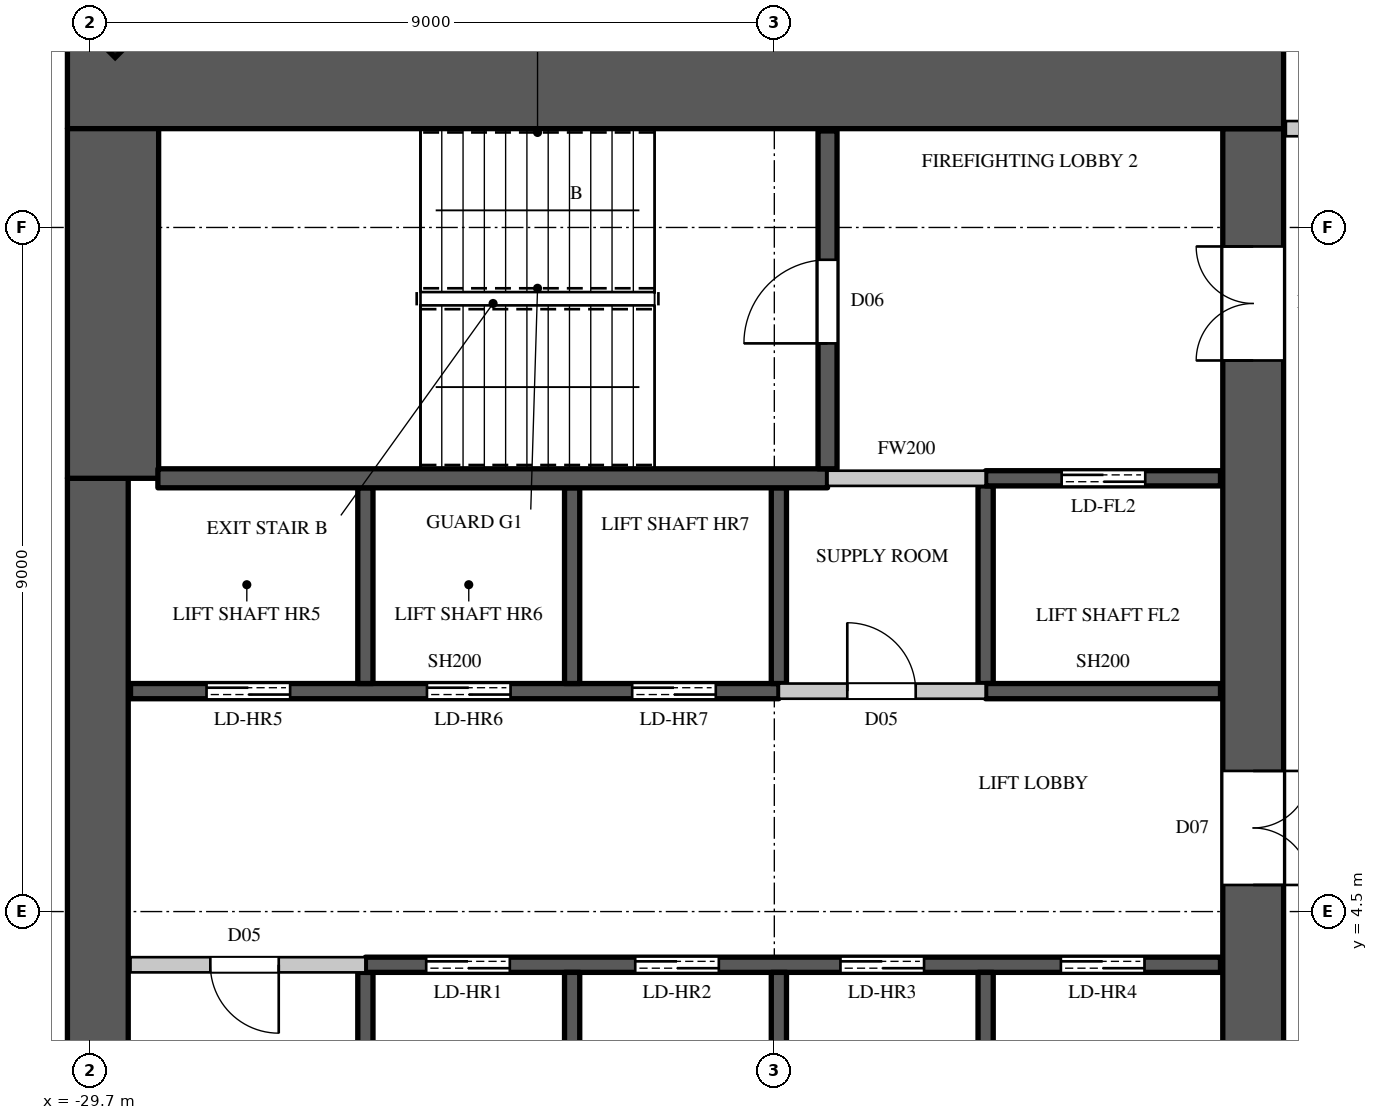
"""IFC4 building model, lengths in metres.
Left out: names, types, materials, properties, quantities, classifications, styles, units other than length and angle.
Written with IfcOpenShell. Run it as: python <this file> out.ifc"""

import sys

from ifc_helpers import new_model, si_unit, direction, frame, frame_2d, origin, origin_2d, place, context, subcontext, project, spatial, rectangle, extrude, element, fill, save


model = new_model("IFC4")
c1 = context("Model", 3, precision=1e-05, world=origin(), true_north=direction((0.0, 1.0)))
c2 = subcontext(c1, "Body", "Model", "MODEL_VIEW")
j1 = project(units=[si_unit("LENGTHUNIT", "METRE"), si_unit("PLANEANGLEUNIT", "RADIAN")], contexts=[c1])
p1 = place(None, origin())
s1 = spatial("IfcSite", under=j1, at=p1, CompositionType="ELEMENT")
p2 = place(p1, origin())
s2 = spatial("IfcBuilding", under=s1, at=p2, CompositionType="ELEMENT")
p3 = place(p2, frame((0.0, 0.0, 230.2)))
s3 = spatial("IfcBuildingStorey", under=s2, at=p3, CompositionType="ELEMENT", Elevation=230.2)
p4 = place(p3, frame((-29.443, 16.443, 0.0), z_axis=(0.0, 0.0, 1.0), x_axis=(-0.707106781187, -0.707106781187, 0.0)))
e1 = element("IfcColumn", 1, at=p4, inside=s3, PredefinedType="COLUMN", context=c2, shape_type="SweptSolid", body=[
    extrude(rectangle(XDim=0.9, YDim=1.1, at=origin_2d()), origin(), (0.0, 0.0, 1.0), 4.1),
])
p5 = place(p3, frame((-30.0, 15.4, 0.0), z_axis=(0.0, 0.0, 1.0), x_axis=(1.0, 0.0, 0.0)))
e2 = element("IfcWall", 2, at=p5, inside=s3, PredefinedType="SHEAR", context=c2, shape_type="SweptSolid", body=[
    extrude(rectangle(XDim=16.0, YDim=1.2, at=frame_2d((8.0, 0.0))), origin(), (0.0, 0.0, 1.0), 4.1),
])
p6 = place(p3, frame((-14.4, -14.8, 0.0), z_axis=(0.0, 0.0, 1.0), x_axis=(0.0, 1.0, 0.0)))
e3 = element("IfcWall", 3, at=p6, inside=s3, PredefinedType="SHEAR", context=c2, shape_type="SweptSolid", body=[
    extrude(rectangle(XDim=29.6, YDim=0.8, at=frame_2d((14.8, 0.0))), origin(), (0.0, 0.0, 1.0), 4.1),
])
p7 = place(p6, frame((1.55, 0.0, 0.0)))
e4 = element("IfcOpeningElement", 4, at=p7, cuts=e3, PredefinedType="OPENING", context=c2, shape_type="SweptSolid", body=[
    extrude(rectangle(XDim=1.5, YDim=2.4, at=frame_2d((0.75, 1.2))), frame((0.0, 0.41, 0.0), z_axis=(0.0, -1.0, 0.0), x_axis=(1.0, 0.0, 0.0)), (0.0, 0.0, 1.0), 0.82),
])
p8 = place(p6, frame((26.55, 0.0, 0.0)))
e5 = element("IfcOpeningElement", 5, at=p8, cuts=e3, PredefinedType="OPENING", context=c2, shape_type="SweptSolid", body=[
    extrude(rectangle(XDim=1.5, YDim=2.4, at=frame_2d((0.75, 1.2))), frame((0.0, 0.41, 0.0), z_axis=(0.0, -1.0, 0.0), x_axis=(1.0, 0.0, 0.0)), (0.0, 0.0, 1.0), 0.82),
])
p9 = place(p6, frame((8.45, 0.0, 0.0)))
e6 = element("IfcOpeningElement", 6, at=p9, cuts=e3, PredefinedType="OPENING", context=c2, shape_type="SweptSolid", body=[
    extrude(rectangle(XDim=1.5, YDim=2.4, at=frame_2d((0.75, 1.2))), frame((0.0, 0.41, 0.0), z_axis=(0.0, -1.0, 0.0), x_axis=(1.0, 0.0, 0.0)), (0.0, 0.0, 1.0), 0.82),
])
p10 = place(p6, frame((19.65, 0.0, 0.0)))
e7 = element("IfcOpeningElement", 7, at=p10, cuts=e3, PredefinedType="OPENING", context=c2, shape_type="SweptSolid", body=[
    extrude(rectangle(XDim=1.5, YDim=2.4, at=frame_2d((0.75, 1.2))), frame((0.0, 0.41, 0.0), z_axis=(0.0, -1.0, 0.0), x_axis=(1.0, 0.0, 0.0)), (0.0, 0.0, 1.0), 0.82),
])
p11 = place(p6, frame((14.5, 0.0, 0.0)))
e8 = element("IfcOpeningElement", 8, at=p11, cuts=e3, PredefinedType="OPENING", context=c2, shape_type="SweptSolid", body=[
    extrude(rectangle(XDim=0.6, YDim=2.0, at=frame_2d((0.3, 1.0))), frame((0.0, 0.41, 0.0), z_axis=(0.0, -1.0, 0.0), x_axis=(1.0, 0.0, 0.0)), (0.0, 0.0, 1.0), 0.82),
])
p12 = place(p3, frame((-29.6, -10.2, 0.0), z_axis=(0.0, 0.0, 1.0), x_axis=(0.0, 1.0, 0.0)))
e9 = element("IfcWall", 9, at=p12, inside=s3, PredefinedType="SHEAR", context=c2, shape_type="SweptSolid", body=[
    extrude(rectangle(XDim=20.4, YDim=0.8, at=frame_2d((10.2, 0.0))), origin(), (0.0, 0.0, 1.0), 4.1),
])
p13 = place(p3, frame((-29.4, 10.2, 0.0), z_axis=(0.0, 0.0, 1.0), x_axis=(0.0, 1.0, 0.0)))
e10 = element("IfcWall", 10, at=p13, inside=s3, PredefinedType="SHEAR", context=c2, shape_type="SweptSolid", body=[
    extrude(rectangle(XDim=4.6, YDim=1.2, at=frame_2d((2.3, 0.0))), origin(), (0.0, 0.0, 1.0), 4.1),
])
p14 = place(p3, frame((-29.17, 3.8, 0.0), z_axis=(0.0, 0.0, 1.0), x_axis=(1.0, 0.0, 0.0)))
e11 = element("IfcWall", 11, at=p14, inside=s3, PredefinedType="PARTITIONING", context=c2, shape_type="SweptSolid", body=[
    extrude(rectangle(XDim=3.09, YDim=0.2, at=frame_2d((1.545, 0.0))), origin(), (0.0, 0.0, 1.0), 3.8),
])
p15 = place(p14, frame((1.05, 0.0, 0.0)))
e12 = element("IfcOpeningElement", 12, at=p15, cuts=e11, PredefinedType="OPENING", context=c2, shape_type="SweptSolid", body=[
    extrude(rectangle(XDim=0.9, YDim=2.2, at=frame_2d((0.45, 1.1))), frame((0.0, 0.11, 0.0), z_axis=(0.0, -1.0, 0.0), x_axis=(1.0, 0.0, 0.0)), (0.0, 0.0, 1.0), 0.22),
])
p16 = place(p3, frame((-20.64, 7.4, 0.0), z_axis=(0.0, 0.0, 1.0), x_axis=(1.0, 0.0, 0.0)))
e13 = element("IfcWall", 13, at=p16, inside=s3, PredefinedType="PARTITIONING", context=c2, shape_type="SweptSolid", body=[
    extrude(rectangle(XDim=2.72, YDim=0.2, at=frame_2d((1.36, 0.0))), origin(), (0.0, 0.0, 1.0), 3.8),
])
p17 = place(p16, frame((0.9, 0.0, 0.0)))
e14 = element("IfcOpeningElement", 14, at=p17, cuts=e13, PredefinedType="OPENING", context=c2, shape_type="SweptSolid", body=[
    extrude(rectangle(XDim=0.9, YDim=2.2, at=frame_2d((0.45, 1.1))), frame((0.0, 0.11, 0.0), z_axis=(0.0, -1.0, 0.0), x_axis=(1.0, 0.0, 0.0)), (0.0, 0.0, 1.0), 0.22),
])
p18 = place(p3, frame((-20.0, 10.2, 0.0), z_axis=(0.0, 0.0, 1.0), x_axis=(1.0, 0.0, 0.0)))
e15 = element("IfcWall", 15, at=p18, inside=s3, PredefinedType="PARTITIONING", context=c2, shape_type="SweptSolid", body=[
    extrude(rectangle(XDim=2.08, YDim=0.2, at=frame_2d((1.04, 0.0))), origin(), (0.0, 0.0, 1.0), 3.8),
])
p19 = place(p3, frame((-13.97, 14.8, 0.0), z_axis=(0.0, 0.0, 1.0), x_axis=(1.0, 0.0, 0.0)))
e16 = element("IfcWall", 16, at=p19, inside=s3, PredefinedType="PARTITIONING", context=c2, shape_type="SweptSolid", body=[
    extrude(rectangle(XDim=2.87, YDim=0.2, at=frame_2d((1.435, 0.0))), origin(), (0.0, 0.0, 1.0), 3.8),
])
p20 = place(p3, frame((-29.17, 7.4, 0.0), z_axis=(0.0, 0.0, 1.0), x_axis=(1.0, 0.0, 0.0)))
e17 = element("IfcWall", 17, at=p20, inside=s3, PredefinedType="SHEAR", context=c2, shape_type="SweptSolid", body=[
    extrude(rectangle(XDim=8.53, YDim=0.2, at=frame_2d((4.265, 0.0))), origin(), (0.0, 0.0, 1.0), 3.8),
])
p21 = place(p20, frame((1.0, 0.0, 0.0)))
e18 = element("IfcOpeningElement", 18, at=p21, cuts=e17, PredefinedType="OPENING", context=c2, shape_type="SweptSolid", body=[
    extrude(rectangle(XDim=1.1, YDim=2.2, at=frame_2d((0.55, 1.1))), frame((0.0, 0.11, 0.0), z_axis=(0.0, -1.0, 0.0), x_axis=(1.0, 0.0, 0.0)), (0.0, 0.0, 1.0), 0.22),
])
p22 = place(p20, frame((3.9, 0.0, 0.0)))
e19 = element("IfcOpeningElement", 19, at=p22, cuts=e17, PredefinedType="OPENING", context=c2, shape_type="SweptSolid", body=[
    extrude(rectangle(XDim=1.1, YDim=2.2, at=frame_2d((0.55, 1.1))), frame((0.0, 0.11, 0.0), z_axis=(0.0, -1.0, 0.0), x_axis=(1.0, 0.0, 0.0)), (0.0, 0.0, 1.0), 0.22),
])
p23 = place(p20, frame((6.6, 0.0, 0.0)))
e20 = element("IfcOpeningElement", 20, at=p23, cuts=e17, PredefinedType="OPENING", context=c2, shape_type="SweptSolid", body=[
    extrude(rectangle(XDim=1.1, YDim=2.2, at=frame_2d((0.55, 1.1))), frame((0.0, 0.11, 0.0), z_axis=(0.0, -1.0, 0.0), x_axis=(1.0, 0.0, 0.0)), (0.0, 0.0, 1.0), 0.22),
])
p24 = place(p3, frame((-26.08, 1.1, 0.0), z_axis=(0.0, 0.0, 1.0), x_axis=(0.0, 1.0, 0.0)))
e21 = element("IfcWall", 21, at=p24, inside=s3, PredefinedType="SHEAR", context=c2, shape_type="SweptSolid", body=[
    extrude(rectangle(XDim=2.6, YDim=0.2, at=frame_2d((1.3, 0.0))), origin(), (0.0, 0.0, 1.0), 3.8),
])
p25 = place(p3, frame((-26.08, 3.8, 0.0), z_axis=(0.0, 0.0, 1.0), x_axis=(1.0, 0.0, 0.0)))
e22 = element("IfcWall", 22, at=p25, inside=s3, PredefinedType="SHEAR", context=c2, shape_type="SweptSolid", body=[
    extrude(rectangle(XDim=11.25, YDim=0.2, at=frame_2d((5.625, 0.0))), origin(), (0.0, 0.0, 1.0), 3.8),
])
p26 = place(p25, frame((0.8, 0.0, 0.0)))
e23 = element("IfcOpeningElement", 23, at=p26, cuts=e22, PredefinedType="OPENING", context=c2, shape_type="SweptSolid", body=[
    extrude(rectangle(XDim=1.1, YDim=2.2, at=frame_2d((0.55, 1.1))), frame((0.0, 0.11, 0.0), z_axis=(0.0, -1.0, 0.0), x_axis=(1.0, 0.0, 0.0)), (0.0, 0.0, 1.0), 0.22),
])
p27 = place(p25, frame((3.55, 0.0, 0.0)))
e24 = element("IfcOpeningElement", 24, at=p27, cuts=e22, PredefinedType="OPENING", context=c2, shape_type="SweptSolid", body=[
    extrude(rectangle(XDim=1.1, YDim=2.2, at=frame_2d((0.55, 1.1))), frame((0.0, 0.11, 0.0), z_axis=(0.0, -1.0, 0.0), x_axis=(1.0, 0.0, 0.0)), (0.0, 0.0, 1.0), 0.22),
])
p28 = place(p25, frame((6.25, 0.0, 0.0)))
e25 = element("IfcOpeningElement", 25, at=p28, cuts=e22, PredefinedType="OPENING", context=c2, shape_type="SweptSolid", body=[
    extrude(rectangle(XDim=1.1, YDim=2.2, at=frame_2d((0.55, 1.1))), frame((0.0, 0.11, 0.0), z_axis=(0.0, -1.0, 0.0), x_axis=(1.0, 0.0, 0.0)), (0.0, 0.0, 1.0), 0.22),
])
p29 = place(p25, frame((9.15, 0.0, 0.0)))
e26 = element("IfcOpeningElement", 26, at=p29, cuts=e22, PredefinedType="OPENING", context=c2, shape_type="SweptSolid", body=[
    extrude(rectangle(XDim=1.1, YDim=2.2, at=frame_2d((0.55, 1.1))), frame((0.0, 0.11, 0.0), z_axis=(0.0, -1.0, 0.0), x_axis=(1.0, 0.0, 0.0)), (0.0, 0.0, 1.0), 0.22),
])
p30 = place(p3, frame((-26.08, 7.5, 0.0), z_axis=(0.0, 0.0, 1.0), x_axis=(0.0, 1.0, 0.0)))
e27 = element("IfcWall", 27, at=p30, inside=s3, PredefinedType="SHEAR", context=c2, shape_type="SweptSolid", body=[
    extrude(rectangle(XDim=2.575, YDim=0.2, at=frame_2d((1.288, 0.0))), origin(), (0.0, 0.0, 1.0), 4.1),
])
p31 = place(p3, frame((-23.36, 1.1, 0.0), z_axis=(0.0, 0.0, 1.0), x_axis=(0.0, 1.0, 0.0)))
e28 = element("IfcWall", 28, at=p31, inside=s3, PredefinedType="SHEAR", context=c2, shape_type="SweptSolid", body=[
    extrude(rectangle(XDim=2.6, YDim=0.2, at=frame_2d((1.3, 0.0))), origin(), (0.0, 0.0, 1.0), 4.1),
])
p32 = place(p3, frame((-23.36, 7.5, 0.0), z_axis=(0.0, 0.0, 1.0), x_axis=(0.0, 1.0, 0.0)))
e29 = element("IfcWall", 29, at=p32, inside=s3, PredefinedType="SHEAR", context=c2, shape_type="SweptSolid", body=[
    extrude(rectangle(XDim=2.575, YDim=0.2, at=frame_2d((1.288, 0.0))), origin(), (0.0, 0.0, 1.0), 4.1),
])
p33 = place(p3, frame((-20.64, 1.1, 0.0), z_axis=(0.0, 0.0, 1.0), x_axis=(0.0, 1.0, 0.0)))
e30 = element("IfcWall", 30, at=p33, inside=s3, PredefinedType="SHEAR", context=c2, shape_type="SweptSolid", body=[
    extrude(rectangle(XDim=2.6, YDim=0.2, at=frame_2d((1.3, 0.0))), origin(), (0.0, 0.0, 1.0), 4.1),
])
p34 = place(p3, frame((-20.64, 7.5, 0.0), z_axis=(0.0, 0.0, 1.0), x_axis=(0.0, 1.0, 0.0)))
e31 = element("IfcWall", 31, at=p34, inside=s3, PredefinedType="SHEAR", context=c2, shape_type="SweptSolid", body=[
    extrude(rectangle(XDim=2.575, YDim=0.2, at=frame_2d((1.288, 0.0))), origin(), (0.0, 0.0, 1.0), 3.8),
])
p35 = place(p3, frame((-17.92, 1.1, 0.0), z_axis=(0.0, 0.0, 1.0), x_axis=(0.0, 1.0, 0.0)))
e32 = element("IfcWall", 32, at=p35, inside=s3, PredefinedType="SHEAR", context=c2, shape_type="SweptSolid", body=[
    extrude(rectangle(XDim=2.6, YDim=0.2, at=frame_2d((1.3, 0.0))), origin(), (0.0, 0.0, 1.0), 4.1),
])
p36 = place(p3, frame((-17.92, 7.5, 0.0), z_axis=(0.0, 0.0, 1.0), x_axis=(0.0, 1.0, 0.0)))
e33 = element("IfcWall", 33, at=p36, inside=s3, PredefinedType="SHEAR", context=c2, shape_type="SweptSolid", body=[
    extrude(rectangle(XDim=2.6, YDim=0.2, at=frame_2d((1.3, 0.0))), origin(), (0.0, 0.0, 1.0), 3.8),
])
p37 = place(p3, frame((-17.92, 7.4, 0.0), z_axis=(0.0, 0.0, 1.0), x_axis=(1.0, 0.0, 0.0)))
e34 = element("IfcWall", 34, at=p37, inside=s3, PredefinedType="SHEAR", context=c2, shape_type="SweptSolid", body=[
    extrude(rectangle(XDim=3.09, YDim=0.2, at=frame_2d((1.545, 0.0))), origin(), (0.0, 0.0, 1.0), 3.8),
])
p38 = place(p3, frame((-17.92, 10.2, 0.0), z_axis=(0.0, 0.0, 1.0), x_axis=(1.0, 0.0, 0.0)))
e35 = element("IfcWall", 35, at=p38, inside=s3, PredefinedType="SHEAR", context=c2, shape_type="SweptSolid", body=[
    extrude(rectangle(XDim=3.09, YDim=0.2, at=frame_2d((1.545, 0.0))), origin(), (0.0, 0.0, 1.0), 3.8),
])
p39 = place(p38, frame((1.0, 0.0, 0.0)))
e36 = element("IfcOpeningElement", 36, at=p39, cuts=e35, PredefinedType="OPENING", context=c2, shape_type="SweptSolid", body=[
    extrude(rectangle(XDim=1.1, YDim=2.2, at=frame_2d((0.55, 1.1))), frame((0.0, 0.11, 0.0), z_axis=(0.0, -1.0, 0.0), x_axis=(1.0, 0.0, 0.0)), (0.0, 0.0, 1.0), 0.22),
])
p40 = place(p3, frame((-28.81, 10.2, 0.0), z_axis=(0.0, 0.0, 1.0), x_axis=(1.0, 0.0, 0.0)))
e37 = element("IfcWall", 37, at=p40, inside=s3, PredefinedType="SHEAR", context=c2, shape_type="SweptSolid", body=[
    extrude(rectangle(XDim=8.81, YDim=0.25, at=frame_2d((4.405, 0.0))), origin(), (0.0, 0.0, 1.0), 3.8),
])
p41 = place(p3, frame((-20.0, 10.325, 0.0), z_axis=(0.0, 0.0, 1.0), x_axis=(0.0, 1.0, 0.0)))
e38 = element("IfcWall", 38, at=p41, inside=s3, PredefinedType="SHEAR", context=c2, shape_type="SweptSolid", body=[
    extrude(rectangle(XDim=4.445, YDim=0.25, at=frame_2d((2.223, 0.0))), origin(), (0.0, 0.0, 1.0), 3.8),
])
p42 = place(p41, frame((1.65, 0.0, 0.0)))
e39 = element("IfcOpeningElement", 39, at=p42, cuts=e38, PredefinedType="OPENING", context=c2, shape_type="SweptSolid", body=[
    extrude(rectangle(XDim=1.1, YDim=2.2, at=frame_2d((0.55, 1.1))), frame((0.0, 0.135, 0.0), z_axis=(0.0, -1.0, 0.0), x_axis=(1.0, 0.0, 0.0)), (0.0, 0.0, 1.0), 0.27),
])
p43 = place(p42, origin())
e40 = element("IfcDoor", 40, at=p43, inside=s3, OperationType="SINGLE_SWING_LEFT", PredefinedType="DOOR", context=c2, shape_type="SweptSolid", body=[
    extrude(rectangle(XDim=1.1, YDim=2.2, at=frame_2d((0.55, 1.1))), frame((0.0, 0.025, 0.0), z_axis=(0.0, -1.0, 0.0), x_axis=(1.0, 0.0, 0.0)), (0.0, 0.0, 1.0), 0.05),
])
fill(e39, e40)
p44 = place(p15, origin())
e41 = element("IfcDoor", 41, at=p44, inside=s3, OperationType="SINGLE_SWING_LEFT", PredefinedType="DOOR", context=c2, shape_type="SweptSolid", body=[
    extrude(rectangle(XDim=0.9, YDim=2.2, at=frame_2d((0.45, 1.1))), frame((0.0, 0.025, 0.0), z_axis=(0.0, -1.0, 0.0), x_axis=(1.0, 0.0, 0.0)), (0.0, 0.0, 1.0), 0.05),
])
fill(e12, e41)
p45 = place(p17, origin())
e42 = element("IfcDoor", 42, at=p45, inside=s3, OperationType="SINGLE_SWING_LEFT", PredefinedType="DOOR", context=c2, shape_type="SweptSolid", body=[
    extrude(rectangle(XDim=0.9, YDim=2.2, at=frame_2d((0.45, 1.1))), frame((0.0, 0.025, 0.0), z_axis=(0.0, -1.0, 0.0), x_axis=(1.0, 0.0, 0.0)), (0.0, 0.0, 1.0), 0.05),
])
fill(e14, e42)
p46 = place(p26, origin())
e43 = element("IfcDoor", 43, at=p46, inside=s3, OperationType="DOUBLE_DOOR_SLIDING", PredefinedType="DOOR", context=c2, shape_type="SweptSolid", body=[
    extrude(rectangle(XDim=1.1, YDim=2.2, at=frame_2d((0.55, 1.1))), frame((0.0, 0.025, 0.0), z_axis=(0.0, -1.0, 0.0), x_axis=(1.0, 0.0, 0.0)), (0.0, 0.0, 1.0), 0.05),
])
fill(e23, e43)
p47 = place(p27, origin())
e44 = element("IfcDoor", 44, at=p47, inside=s3, OperationType="DOUBLE_DOOR_SLIDING", PredefinedType="DOOR", context=c2, shape_type="SweptSolid", body=[
    extrude(rectangle(XDim=1.1, YDim=2.2, at=frame_2d((0.55, 1.1))), frame((0.0, 0.025, 0.0), z_axis=(0.0, -1.0, 0.0), x_axis=(1.0, 0.0, 0.0)), (0.0, 0.0, 1.0), 0.05),
])
fill(e24, e44)
p48 = place(p28, origin())
e45 = element("IfcDoor", 45, at=p48, inside=s3, OperationType="DOUBLE_DOOR_SLIDING", PredefinedType="DOOR", context=c2, shape_type="SweptSolid", body=[
    extrude(rectangle(XDim=1.1, YDim=2.2, at=frame_2d((0.55, 1.1))), frame((0.0, 0.025, 0.0), z_axis=(0.0, -1.0, 0.0), x_axis=(1.0, 0.0, 0.0)), (0.0, 0.0, 1.0), 0.05),
])
fill(e25, e45)
p49 = place(p29, origin())
e46 = element("IfcDoor", 46, at=p49, inside=s3, OperationType="DOUBLE_DOOR_SLIDING", PredefinedType="DOOR", context=c2, shape_type="SweptSolid", body=[
    extrude(rectangle(XDim=1.1, YDim=2.2, at=frame_2d((0.55, 1.1))), frame((0.0, 0.025, 0.0), z_axis=(0.0, -1.0, 0.0), x_axis=(1.0, 0.0, 0.0)), (0.0, 0.0, 1.0), 0.05),
])
fill(e26, e46)
p50 = place(p21, origin())
e47 = element("IfcDoor", 47, at=p50, inside=s3, OperationType="DOUBLE_DOOR_SLIDING", PredefinedType="DOOR", context=c2, shape_type="SweptSolid", body=[
    extrude(rectangle(XDim=1.1, YDim=2.2, at=frame_2d((0.55, 1.1))), frame((0.0, 0.025, 0.0), z_axis=(0.0, -1.0, 0.0), x_axis=(1.0, 0.0, 0.0)), (0.0, 0.0, 1.0), 0.05),
])
fill(e18, e47)
p51 = place(p22, origin())
e48 = element("IfcDoor", 48, at=p51, inside=s3, OperationType="DOUBLE_DOOR_SLIDING", PredefinedType="DOOR", context=c2, shape_type="SweptSolid", body=[
    extrude(rectangle(XDim=1.1, YDim=2.2, at=frame_2d((0.55, 1.1))), frame((0.0, 0.025, 0.0), z_axis=(0.0, -1.0, 0.0), x_axis=(1.0, 0.0, 0.0)), (0.0, 0.0, 1.0), 0.05),
])
fill(e19, e48)
p52 = place(p23, origin())
e49 = element("IfcDoor", 49, at=p52, inside=s3, OperationType="DOUBLE_DOOR_SLIDING", PredefinedType="DOOR", context=c2, shape_type="SweptSolid", body=[
    extrude(rectangle(XDim=1.1, YDim=2.2, at=frame_2d((0.55, 1.1))), frame((0.0, 0.025, 0.0), z_axis=(0.0, -1.0, 0.0), x_axis=(1.0, 0.0, 0.0)), (0.0, 0.0, 1.0), 0.05),
])
fill(e20, e49)
p53 = place(p39, origin())
e50 = element("IfcDoor", 50, at=p53, inside=s3, OperationType="DOUBLE_DOOR_SLIDING", PredefinedType="DOOR", context=c2, shape_type="SweptSolid", body=[
    extrude(rectangle(XDim=1.1, YDim=2.2, at=frame_2d((0.55, 1.1))), frame((0.0, 0.025, 0.0), z_axis=(0.0, -1.0, 0.0), x_axis=(1.0, 0.0, 0.0)), (0.0, 0.0, 1.0), 0.05),
])
fill(e36, e50)
p54 = place(p8, origin())
e51 = element("IfcDoor", 51, at=p54, inside=s3, OperationType="DOUBLE_DOOR_SINGLE_SWING", PredefinedType="DOOR", context=c2, shape_type="SweptSolid", body=[
    extrude(rectangle(XDim=1.5, YDim=2.4, at=frame_2d((0.75, 1.2))), frame((0.0, 0.395, 0.0), z_axis=(0.0, -1.0, 0.0), x_axis=(1.0, 0.0, 0.0)), (0.0, 0.0, 1.0), 0.05),
])
fill(e5, e51)
p55 = place(p10, origin())
e52 = element("IfcDoor", 52, at=p55, inside=s3, OperationType="DOUBLE_DOOR_SINGLE_SWING", PredefinedType="DOOR", context=c2, shape_type="SweptSolid", body=[
    extrude(rectangle(XDim=1.5, YDim=2.4, at=frame_2d((0.75, 1.2))), frame((0.0, -0.345, 0.0), z_axis=(0.0, -1.0, 0.0), x_axis=(1.0, 0.0, 0.0)), (0.0, 0.0, 1.0), 0.05),
])
fill(e7, e52)
save(model, sys.argv[1])
